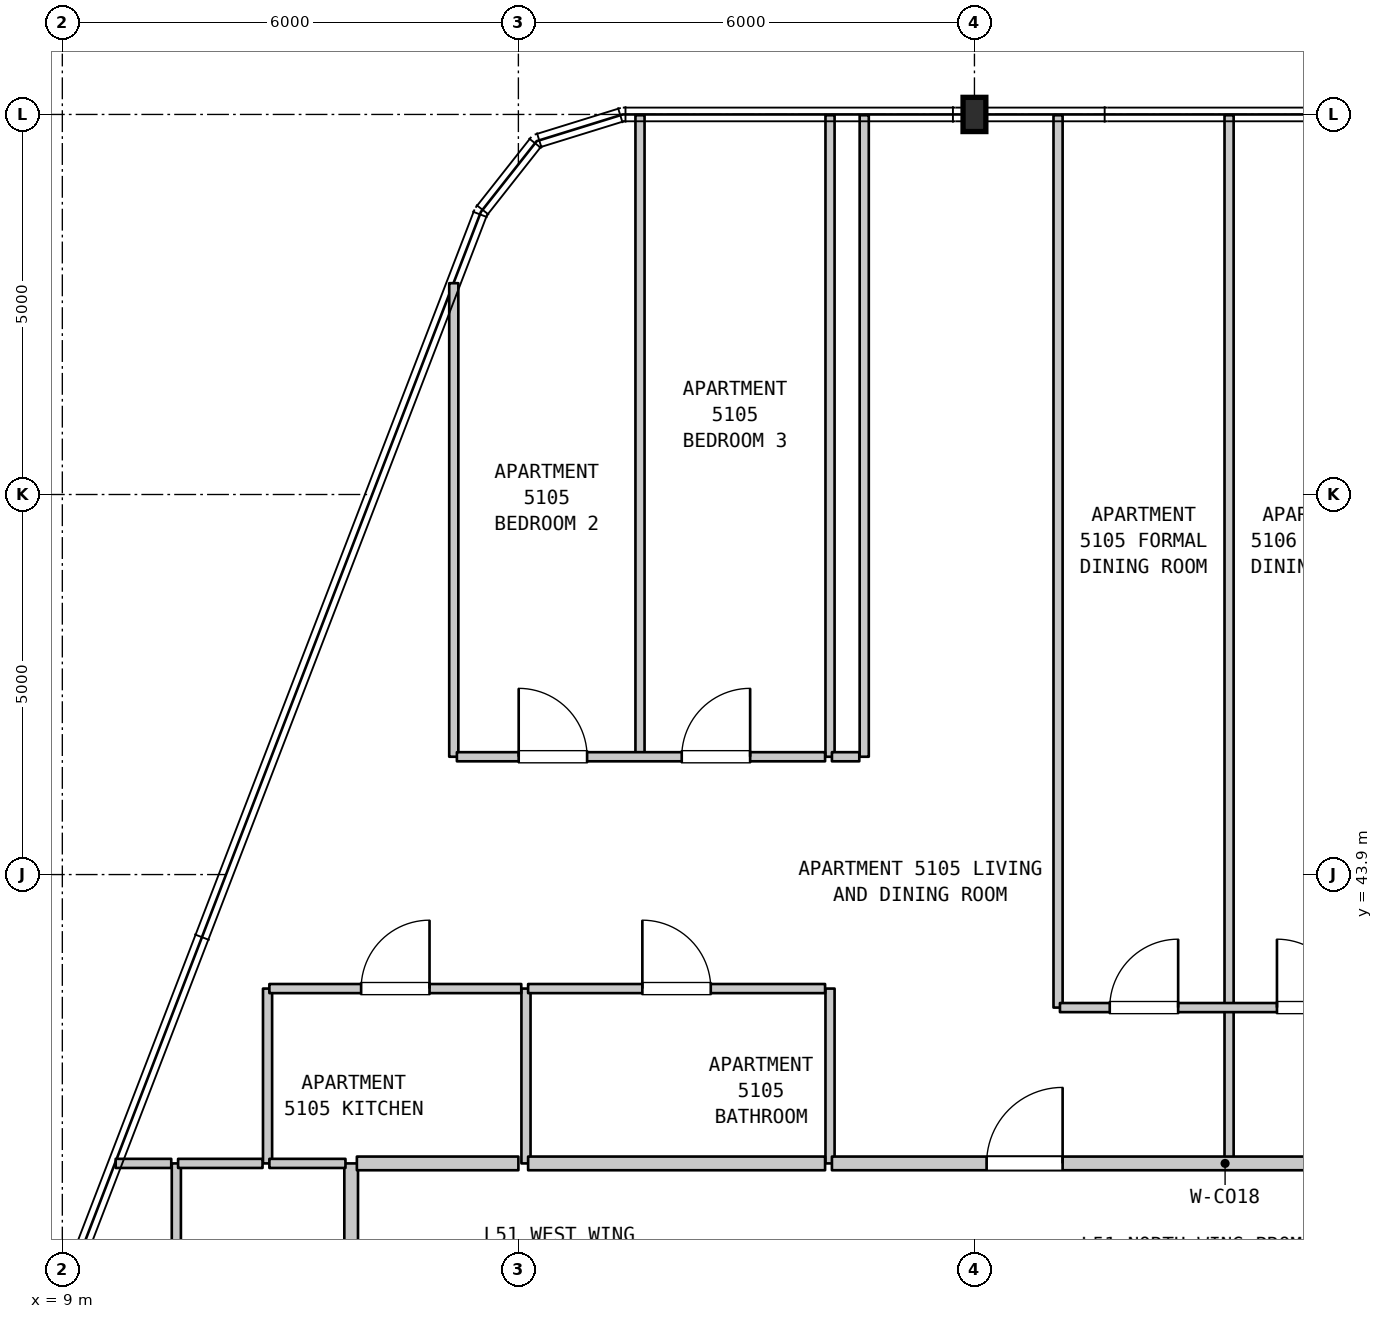
"""IFC4 building model, lengths in metres.
Left out: names, types, materials, properties, quantities, classifications, styles, units other than length and angle.
Written with IfcOpenShell. Run it as: python <this file> out.ifc"""

import sys

from ifc_helpers import new_model, si_unit, direction, frame, frame_2d, origin, origin_2d, place, context, subcontext, project, spatial, rectangle, i_section, extrude, element, fill, save


model = new_model("IFC4")
c1 = context("Model", 3, precision=1e-05, world=origin(), true_north=direction((0.0, 1.0)))
c2 = subcontext(c1, "Body", "Model", "MODEL_VIEW")
j1 = project(units=[si_unit("LENGTHUNIT", "METRE"), si_unit("PLANEANGLEUNIT", "RADIAN")], contexts=[c1])
p1 = place(None, origin())
s1 = spatial("IfcSite", under=j1, at=p1, CompositionType="ELEMENT")
p2 = place(p1, origin())
s2 = spatial("IfcBuilding", under=s1, at=p2, CompositionType="ELEMENT")
p3 = place(p2, frame((0.0, 0.0, 206.9)))
s3 = spatial("IfcBuildingStorey", under=s2, at=p3, CompositionType="ELEMENT", Elevation=206.9)
p4 = place(p3, frame((21.0, 53.9, 0.0), z_axis=(0.0, 0.0, 1.0), x_axis=(1.0, 0.0, 0.0)))
e1 = element("IfcColumn", 1, at=p4, inside=s3, PredefinedType="COLUMN", context=c2, shape_type="SweptSolid", body=[
    extrude(i_section(OverallWidth=0.3, OverallDepth=0.45, WebThickness=0.014, FlangeThickness=0.026, FilletRadius=0.027, at=origin_2d()), origin(), (0.0, 0.0, 1.0), 3.7),
])
p5 = place(p3, frame((10.5, 32.36, 0.0), z_axis=(0.0, 0.0, 1.0), x_axis=(0.0, 1.0, 0.0)))
e2 = element("IfcWall", 2, at=p5, inside=s3, PredefinedType="PARTITIONING", context=c2, shape_type="SweptSolid", body=[
    extrude(rectangle(XDim=7.74, YDim=0.12, at=frame_2d((3.87, 0.0))), origin(), (0.0, 0.0, 1.0), 3.39),
])
p6 = place(p3, frame((11.7, 40.1, 0.0), z_axis=(0.0, 0.0, 1.0), x_axis=(0.0, 1.0, 0.0)))
e3 = element("IfcWall", 3, at=p6, inside=s3, PredefinedType="PARTITIONING", context=c2, shape_type="SweptSolid", body=[
    extrude(rectangle(XDim=2.3, YDim=0.12, at=frame_2d((1.15, 0.0))), origin(), (0.0, 0.0, 1.0), 3.39),
])
p7 = place(p3, frame((12.8, 32.36, 0.0), z_axis=(0.0, 0.0, 1.0), x_axis=(0.0, 1.0, 0.0)))
e4 = element("IfcWall", 4, at=p7, inside=s3, PredefinedType="STANDARD", context=c2, shape_type="SweptSolid", body=[
    extrude(rectangle(XDim=7.74, YDim=0.18, at=frame_2d((3.87, 0.0))), origin(), (0.0, 0.0, 1.0), 3.39),
])
p8 = place(p3, frame((14.15, 45.45, 0.0), z_axis=(0.0, 0.0, 1.0), x_axis=(0.0, 1.0, 0.0)))
e5 = element("IfcWall", 5, at=p8, inside=s3, PredefinedType="PARTITIONING", context=c2, shape_type="SweptSolid", body=[
    extrude(rectangle(XDim=6.23, YDim=0.12, at=frame_2d((3.115, 0.0))), origin(), (0.0, 0.0, 1.0), 3.39),
])
p9 = place(p3, frame((15.1, 40.1, 0.0), z_axis=(0.0, 0.0, 1.0), x_axis=(0.0, 1.0, 0.0)))
e6 = element("IfcWall", 6, at=p9, inside=s3, PredefinedType="PARTITIONING", context=c2, shape_type="SweptSolid", body=[
    extrude(rectangle(XDim=2.3, YDim=0.12, at=frame_2d((1.15, 0.0))), origin(), (0.0, 0.0, 1.0), 3.39),
])
p10 = place(p3, frame((16.6, 45.45, 0.0), z_axis=(0.0, 0.0, 1.0), x_axis=(0.0, 1.0, 0.0)))
e7 = element("IfcWall", 7, at=p10, inside=s3, PredefinedType="PARTITIONING", context=c2, shape_type="SweptSolid", body=[
    extrude(rectangle(XDim=8.44, YDim=0.12, at=frame_2d((4.22, 0.0))), origin(), (0.0, 0.0, 1.0), 3.39),
])
p11 = place(p3, frame((19.1, 40.1, 0.0), z_axis=(0.0, 0.0, 1.0), x_axis=(0.0, 1.0, 0.0)))
e8 = element("IfcWall", 8, at=p11, inside=s3, PredefinedType="PARTITIONING", context=c2, shape_type="SweptSolid", body=[
    extrude(rectangle(XDim=2.3, YDim=0.12, at=frame_2d((1.15, 0.0))), origin(), (0.0, 0.0, 1.0), 3.39),
])
for number, where, z_axis, x_axis in (
    (9, (19.1, 45.45, 0.0), (0.0, 0.0, 1.0), (0.0, 1.0, 0.0)),
    (10, (19.55, 45.45, 0.0), (0.0, 0.0, 1.0), (0.0, 1.0, 0.0)),
):
    element("IfcWall", number, at=place(p3, frame(where, z_axis=z_axis, x_axis=x_axis)), inside=s3, PredefinedType="PARTITIONING", context=c2, shape_type="SweptSolid", body=[
        extrude(rectangle(XDim=8.44, YDim=0.12, at=frame_2d((4.22, 0.0))), origin(), (0.0, 0.0, 1.0), 3.39),
    ])
p12 = place(p3, frame((22.1, 42.15, 0.0), z_axis=(0.0, 0.0, 1.0), x_axis=(0.0, 1.0, 0.0)))
e11 = element("IfcWall", 11, at=p12, inside=s3, PredefinedType="PARTITIONING", context=c2, shape_type="SweptSolid", body=[
    extrude(rectangle(XDim=11.74, YDim=0.12, at=frame_2d((5.87, 0.0))), origin(), (0.0, 0.0, 1.0), 3.39),
])
p13 = place(p3, frame((24.35, 40.1, 0.0), z_axis=(0.0, 0.0, 1.0), x_axis=(0.0, 1.0, 0.0)))
e12 = element("IfcWall", 12, at=p13, inside=s3, PredefinedType="PARTITIONING", context=c2, shape_type="SweptSolid", body=[
    extrude(rectangle(XDim=2.05, YDim=0.12, at=frame_2d((1.025, 0.0))), origin(), (0.0, 0.0, 1.0), 3.39),
])
p14 = place(p3, frame((24.35, 42.15, 0.0), z_axis=(0.0, 0.0, 1.0), x_axis=(0.0, 1.0, 0.0)))
e13 = element("IfcWall", 13, at=p14, inside=s3, PredefinedType="PARTITIONING", context=c2, shape_type="SweptSolid", body=[
    extrude(rectangle(XDim=11.74, YDim=0.12, at=frame_2d((5.87, 0.0))), origin(), (0.0, 0.0, 1.0), 3.39),
])
p15 = place(p3, frame((9.702, 40.1, 0.0), z_axis=(0.0, 0.0, 1.0), x_axis=(1.0, 0.0, 0.0)))
e14 = element("IfcWall", 14, at=p15, inside=s3, PredefinedType="PARTITIONING", context=c2, shape_type="SweptSolid", body=[
    extrude(rectangle(XDim=0.731, YDim=0.12, at=frame_2d((0.366, 0.0))), origin(), (0.0, 0.0, 1.0), 3.39),
])
p16 = place(p3, frame((10.523, 40.1, 0.0), z_axis=(0.0, 0.0, 1.0), x_axis=(1.0, 0.0, 0.0)))
e15 = element("IfcWall", 15, at=p16, inside=s3, PredefinedType="PARTITIONING", context=c2, shape_type="SweptSolid", body=[
    extrude(rectangle(XDim=1.111, YDim=0.12, at=frame_2d((0.556, 0.0))), origin(), (0.0, 0.0, 1.0), 3.39),
])
p17 = place(p3, frame((11.724, 40.1, 0.0), z_axis=(0.0, 0.0, 1.0), x_axis=(1.0, 0.0, 0.0)))
e16 = element("IfcWall", 16, at=p17, inside=s3, PredefinedType="PARTITIONING", context=c2, shape_type="SweptSolid", body=[
    extrude(rectangle(XDim=1.001, YDim=0.12, at=frame_2d((0.5, 0.0))), origin(), (0.0, 0.0, 1.0), 3.39),
])
p18 = place(p3, frame((12.875, 40.1, 0.0), z_axis=(0.0, 0.0, 1.0), x_axis=(1.0, 0.0, 0.0)))
e17 = element("IfcWall", 17, at=p18, inside=s3, PredefinedType="STANDARD", context=c2, shape_type="SweptSolid", body=[
    extrude(rectangle(XDim=2.125, YDim=0.18, at=frame_2d((1.062, 0.0))), origin(), (0.0, 0.0, 1.0), 3.39),
])
p19 = place(p3, frame((15.128, 40.1, 0.0), z_axis=(0.0, 0.0, 1.0), x_axis=(1.0, 0.0, 0.0)))
e18 = element("IfcWall", 18, at=p19, inside=s3, PredefinedType="STANDARD", context=c2, shape_type="SweptSolid", body=[
    extrude(rectangle(XDim=3.907, YDim=0.18, at=frame_2d((1.954, 0.0))), origin(), (0.0, 0.0, 1.0), 3.39),
])
p20 = place(p3, frame((19.125, 40.1, 0.0), z_axis=(0.0, 0.0, 1.0), x_axis=(1.0, 0.0, 0.0)))
e19 = element("IfcWall", 19, at=p20, inside=s3, PredefinedType="STANDARD", context=c2, shape_type="SweptSolid", body=[
    extrude(rectangle(XDim=10.345, YDim=0.18, at=frame_2d((5.172, 0.0))), origin(), (0.0, 0.0, 1.0), 3.39),
])
p21 = place(p20, frame((2.035, 0.0, 0.0)))
e20 = element("IfcOpeningElement", 20, at=p21, cuts=e19, PredefinedType="OPENING", context=c2, shape_type="SweptSolid", body=[
    extrude(rectangle(XDim=1.0, YDim=2.15, at=frame_2d((0.5, 1.075))), frame((0.0, 0.1, 0.0), z_axis=(0.0, -1.0, 0.0), x_axis=(1.0, 0.0, 0.0)), (0.0, 0.0, 1.0), 0.2),
])
p22 = place(p20, frame((7.235, 0.0, 0.0)))
e21 = element("IfcOpeningElement", 21, at=p22, cuts=e19, PredefinedType="OPENING", context=c2, shape_type="SweptSolid", body=[
    extrude(rectangle(XDim=1.0, YDim=2.15, at=frame_2d((0.5, 1.075))), frame((0.0, 0.1, 0.0), z_axis=(0.0, -1.0, 0.0), x_axis=(1.0, 0.0, 0.0)), (0.0, 0.0, 1.0), 0.2),
])
p23 = place(p3, frame((22.125, 42.15, 0.0), z_axis=(0.0, 0.0, 1.0), x_axis=(1.0, 0.0, 0.0)))
e22 = element("IfcWall", 22, at=p23, inside=s3, PredefinedType="PARTITIONING", context=c2, shape_type="SweptSolid", body=[
    extrude(rectangle(XDim=4.41, YDim=0.12, at=frame_2d((2.205, 0.0))), origin(), (0.0, 0.0, 1.0), 3.39),
])
p24 = place(p23, frame((0.655, 0.0, 0.0)))
e23 = element("IfcOpeningElement", 23, at=p24, cuts=e22, PredefinedType="OPENING", context=c2, shape_type="SweptSolid", body=[
    extrude(rectangle(XDim=0.9, YDim=2.15, at=frame_2d((0.45, 1.075))), frame((0.0, 0.07, 0.0), z_axis=(0.0, -1.0, 0.0), x_axis=(1.0, 0.0, 0.0)), (0.0, 0.0, 1.0), 0.14),
])
p25 = place(p23, frame((2.855, 0.0, 0.0)))
e24 = element("IfcOpeningElement", 24, at=p25, cuts=e22, PredefinedType="OPENING", context=c2, shape_type="SweptSolid", body=[
    extrude(rectangle(XDim=0.9, YDim=2.15, at=frame_2d((0.45, 1.075))), frame((0.0, 0.07, 0.0), z_axis=(0.0, -1.0, 0.0), x_axis=(1.0, 0.0, 0.0)), (0.0, 0.0, 1.0), 0.14),
])
p26 = place(p3, frame((11.724, 42.4, 0.0), z_axis=(0.0, 0.0, 1.0), x_axis=(1.0, 0.0, 0.0)))
e25 = element("IfcWall", 25, at=p26, inside=s3, PredefinedType="PARTITIONING", context=c2, shape_type="SweptSolid", body=[
    extrude(rectangle(XDim=3.314, YDim=0.12, at=frame_2d((1.657, 0.0))), origin(), (0.0, 0.0, 1.0), 3.39),
])
p27 = place(p26, frame((1.207, 0.0, 0.0)))
e26 = element("IfcOpeningElement", 26, at=p27, cuts=e25, PredefinedType="OPENING", context=c2, shape_type="SweptSolid", body=[
    extrude(rectangle(XDim=0.9, YDim=2.15, at=frame_2d((0.45, 1.075))), frame((0.0, 0.07, 0.0), z_axis=(0.0, -1.0, 0.0), x_axis=(1.0, 0.0, 0.0)), (0.0, 0.0, 1.0), 0.14),
])
p28 = place(p3, frame((15.128, 42.4, 0.0), z_axis=(0.0, 0.0, 1.0), x_axis=(1.0, 0.0, 0.0)))
e27 = element("IfcWall", 27, at=p28, inside=s3, PredefinedType="PARTITIONING", context=c2, shape_type="SweptSolid", body=[
    extrude(rectangle(XDim=3.907, YDim=0.12, at=frame_2d((1.954, 0.0))), origin(), (0.0, 0.0, 1.0), 3.39),
])
p29 = place(p28, frame((1.503, 0.0, 0.0)))
e28 = element("IfcOpeningElement", 28, at=p29, cuts=e27, PredefinedType="OPENING", context=c2, shape_type="SweptSolid", body=[
    extrude(rectangle(XDim=0.9, YDim=2.1, at=frame_2d((0.45, 1.05))), frame((0.0, 0.07, 0.0), z_axis=(0.0, -1.0, 0.0), x_axis=(1.0, 0.0, 0.0)), (0.0, 0.0, 1.0), 0.14),
])
p30 = place(p3, frame((14.191, 45.45, 0.0), z_axis=(0.0, 0.0, 1.0), x_axis=(1.0, 0.0, 0.0)))
e29 = element("IfcWall", 29, at=p30, inside=s3, PredefinedType="PARTITIONING", context=c2, shape_type="SweptSolid", body=[
    extrude(rectangle(XDim=4.844, YDim=0.12, at=frame_2d((2.422, 0.0))), origin(), (0.0, 0.0, 1.0), 3.39),
])
p31 = place(p30, frame((0.813, 0.0, 0.0)))
e30 = element("IfcOpeningElement", 30, at=p31, cuts=e29, PredefinedType="OPENING", context=c2, shape_type="SweptSolid", body=[
    extrude(rectangle(XDim=0.9, YDim=2.15, at=frame_2d((0.45, 1.075))), frame((0.0, 0.07, 0.0), z_axis=(0.0, -1.0, 0.0), x_axis=(1.0, 0.0, 0.0)), (0.0, 0.0, 1.0), 0.14),
])
p32 = place(p30, frame((2.958, 0.0, 0.0)))
e31 = element("IfcOpeningElement", 31, at=p32, cuts=e29, PredefinedType="OPENING", context=c2, shape_type="SweptSolid", body=[
    extrude(rectangle(XDim=0.9, YDim=2.15, at=frame_2d((0.45, 1.075))), frame((0.0, 0.07, 0.0), z_axis=(0.0, -1.0, 0.0), x_axis=(1.0, 0.0, 0.0)), (0.0, 0.0, 1.0), 0.14),
])
p33 = place(p3, frame((19.125, 45.45, 0.0), z_axis=(0.0, 0.0, 1.0), x_axis=(1.0, 0.0, 0.0)))
e32 = element("IfcWall", 32, at=p33, inside=s3, PredefinedType="PARTITIONING", context=c2, shape_type="SweptSolid", body=[
    extrude(rectangle(XDim=0.36, YDim=0.12, at=frame_2d((0.18, 0.0))), origin(), (0.0, 0.0, 1.0), 3.39),
])
p34 = place(p21, origin())
e33 = element("IfcDoor", 33, at=p34, inside=s3, OperationType="SINGLE_SWING_RIGHT", PredefinedType="DOOR", context=c2, shape_type="SweptSolid", body=[
    extrude(rectangle(XDim=1.0, YDim=2.15, at=frame_2d((0.5, 1.075))), frame((0.0, 0.025, 0.0), z_axis=(0.0, -1.0, 0.0), x_axis=(1.0, 0.0, 0.0)), (0.0, 0.0, 1.0), 0.05),
])
fill(e20, e33)
p35 = place(p24, origin())
e34 = element("IfcDoor", 34, at=p35, inside=s3, OperationType="SINGLE_SWING_RIGHT", PredefinedType="DOOR", context=c2, shape_type="SweptSolid", body=[
    extrude(rectangle(XDim=0.9, YDim=2.15, at=frame_2d((0.45, 1.075))), frame((0.0, 0.025, 0.0), z_axis=(0.0, -1.0, 0.0), x_axis=(1.0, 0.0, 0.0)), (0.0, 0.0, 1.0), 0.05),
])
fill(e23, e34)
p36 = place(p25, origin())
e35 = element("IfcDoor", 35, at=p36, inside=s3, OperationType="SINGLE_SWING_LEFT", PredefinedType="DOOR", context=c2, shape_type="SweptSolid", body=[
    extrude(rectangle(XDim=0.9, YDim=2.15, at=frame_2d((0.45, 1.075))), frame((0.0, 0.025, 0.0), z_axis=(0.0, -1.0, 0.0), x_axis=(1.0, 0.0, 0.0)), (0.0, 0.0, 1.0), 0.05),
])
fill(e24, e35)
p37 = place(p27, origin())
e36 = element("IfcDoor", 36, at=p37, inside=s3, OperationType="SINGLE_SWING_RIGHT", PredefinedType="DOOR", context=c2, shape_type="SweptSolid", body=[
    extrude(rectangle(XDim=0.9, YDim=2.15, at=frame_2d((0.45, 1.075))), frame((0.0, 0.025, 0.0), z_axis=(0.0, -1.0, 0.0), x_axis=(1.0, 0.0, 0.0)), (0.0, 0.0, 1.0), 0.05),
])
fill(e26, e36)
p38 = place(p29, origin())
e37 = element("IfcDoor", 37, at=p38, inside=s3, OperationType="SINGLE_SWING_LEFT", PredefinedType="DOOR", context=c2, shape_type="SweptSolid", body=[
    extrude(rectangle(XDim=0.9, YDim=2.1, at=frame_2d((0.45, 1.05))), frame((0.0, 0.025, 0.0), z_axis=(0.0, -1.0, 0.0), x_axis=(1.0, 0.0, 0.0)), (0.0, 0.0, 1.0), 0.05),
])
fill(e28, e37)
p39 = place(p31, origin())
e38 = element("IfcDoor", 38, at=p39, inside=s3, OperationType="SINGLE_SWING_LEFT", PredefinedType="DOOR", context=c2, shape_type="SweptSolid", body=[
    extrude(rectangle(XDim=0.9, YDim=2.15, at=frame_2d((0.45, 1.075))), frame((0.0, 0.025, 0.0), z_axis=(0.0, -1.0, 0.0), x_axis=(1.0, 0.0, 0.0)), (0.0, 0.0, 1.0), 0.05),
])
fill(e30, e38)
p40 = place(p32, origin())
e39 = element("IfcDoor", 39, at=p40, inside=s3, OperationType="SINGLE_SWING_RIGHT", PredefinedType="DOOR", context=c2, shape_type="SweptSolid", body=[
    extrude(rectangle(XDim=0.9, YDim=2.15, at=frame_2d((0.45, 1.075))), frame((0.0, 0.025, 0.0), z_axis=(0.0, -1.0, 0.0), x_axis=(1.0, 0.0, 0.0)), (0.0, 0.0, 1.0), 0.05),
])
fill(e31, e39)
save(model, sys.argv[1])
